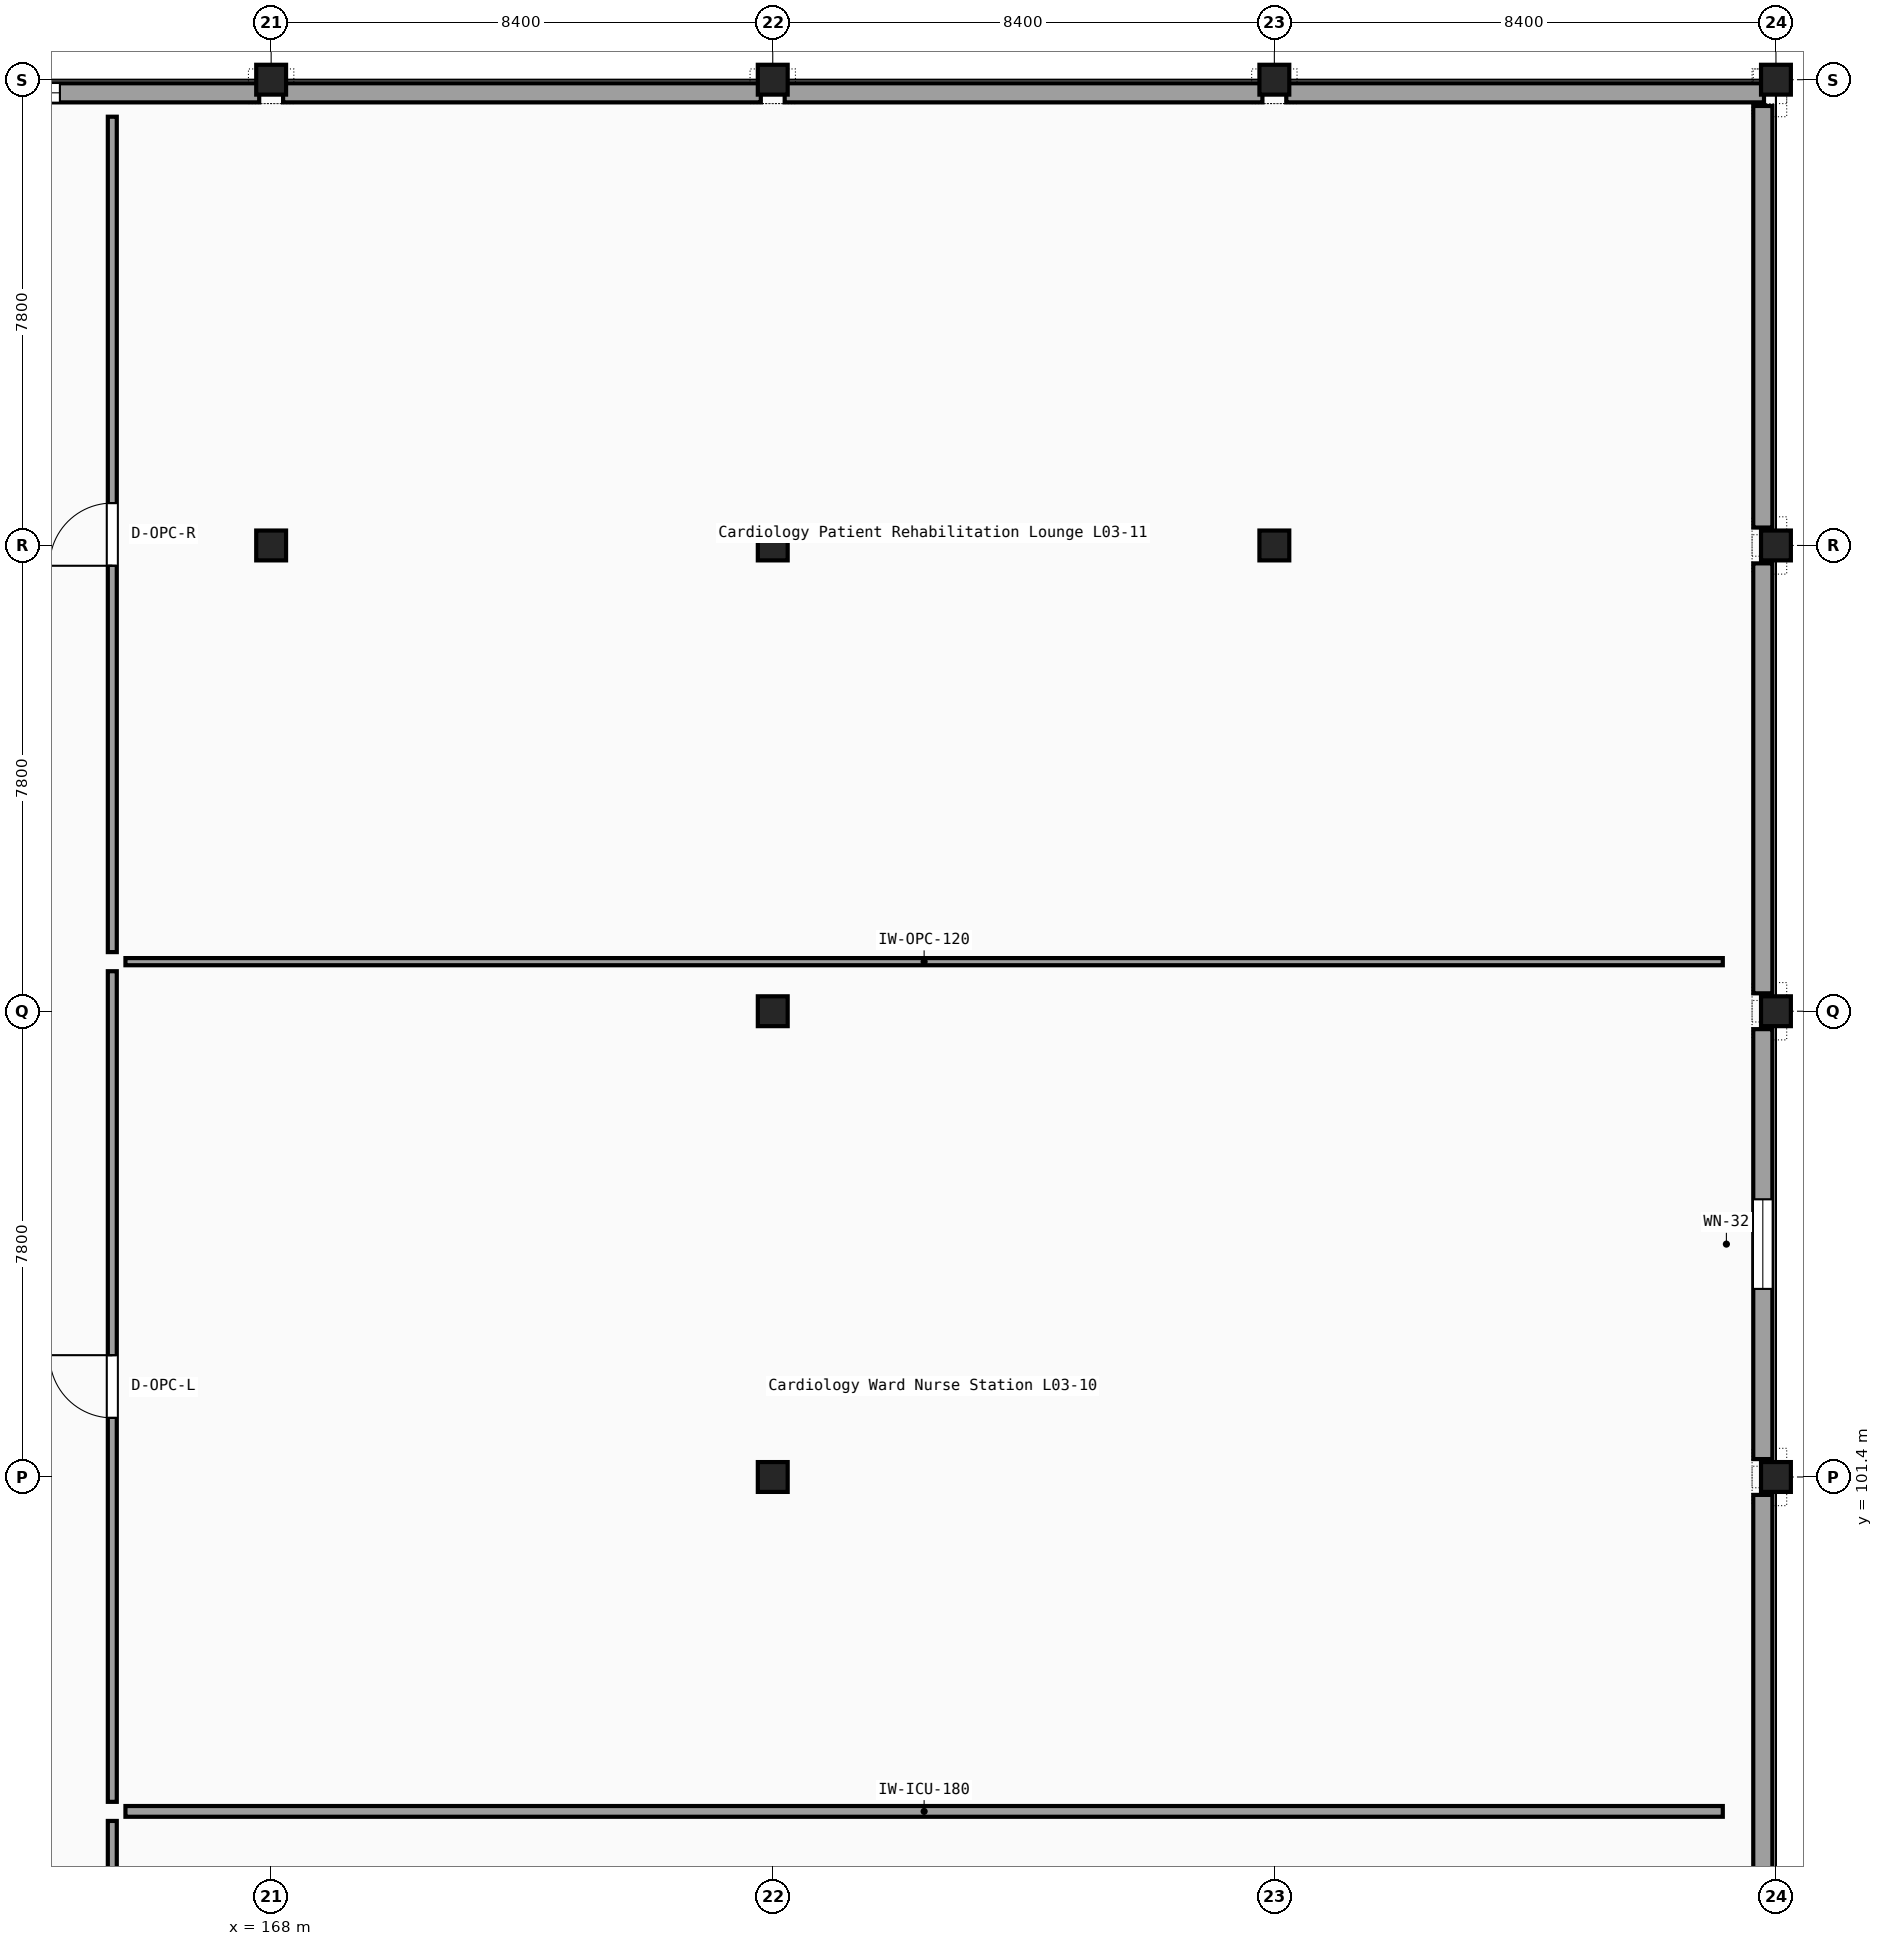
"""IFC4 building model, lengths in metres.
Left out: names, types, materials, properties, quantities, classifications, styles, units other than length and angle.
Written with IfcOpenShell. Run it as: python <this file> out.ifc"""

import sys

from ifc_helpers import new_model, si_unit, direction, frame, frame_2d, origin, origin_2d, place, context, subcontext, project, spatial, rectangle, i_section, extrude, element, fill, save


model = new_model("IFC4")
c1 = context("Model", 3, precision=1e-05, world=origin(), true_north=direction((0.0, 1.0)))
c2 = subcontext(c1, "Body", "Model", "MODEL_VIEW")
j1 = project(units=[si_unit("LENGTHUNIT", "METRE"), si_unit("PLANEANGLEUNIT", "RADIAN")], contexts=[c1])
p1 = place(None, origin())
s1 = spatial("IfcSite", under=j1, at=p1, CompositionType="ELEMENT")
p2 = place(p1, origin())
s2 = spatial("IfcBuilding", under=s1, at=p2, CompositionType="ELEMENT")
p3 = place(p2, frame((0.0, 0.0, 14.85)))
s3 = spatial("IfcBuildingStorey", under=s2, at=p3, CompositionType="ELEMENT", Elevation=14.85)
for number, where, z_axis, x_axis in (
    (1, (168.0, 117.0, 0.0), (0.0, 0.0, 1.0), (1.0, 0.0, 0.0)),
    (2, (168.0, 124.8, 0.0), (0.0, 0.0, 1.0), (1.0, 0.0, 0.0)),
    (3, (176.4, 101.4, 0.0), (0.0, 0.0, 1.0), (1.0, 0.0, 0.0)),
    (4, (176.4, 109.2, 0.0), (0.0, 0.0, 1.0), (1.0, 0.0, 0.0)),
    (5, (176.4, 117.0, 0.0), (0.0, 0.0, 1.0), (1.0, 0.0, 0.0)),
    (6, (176.4, 124.8, 0.0), (0.0, 0.0, 1.0), (1.0, 0.0, 0.0)),
    (7, (184.8, 117.0, 0.0), (0.0, 0.0, 1.0), (1.0, 0.0, 0.0)),
    (8, (184.8, 124.8, 0.0), (0.0, 0.0, 1.0), (1.0, 0.0, 0.0)),
    (9, (193.2, 101.4, 0.0), (0.0, 0.0, 1.0), (1.0, 0.0, 0.0)),
    (10, (193.2, 109.2, 0.0), (0.0, 0.0, 1.0), (1.0, 0.0, 0.0)),
    (11, (193.2, 117.0, 0.0), (0.0, 0.0, 1.0), (1.0, 0.0, 0.0)),
    (12, (193.2, 124.8, 0.0), (0.0, 0.0, 1.0), (1.0, 0.0, 0.0)),
):
    element("IfcColumn", number, at=place(p3, frame(where, z_axis=z_axis, x_axis=x_axis)), inside=s3, PredefinedType="COLUMN", context=c2, shape_type="SweptSolid", body=[
        extrude(i_section(OverallWidth=0.3, OverallDepth=0.5, WebThickness=0.014, FlangeThickness=0.028, FilletRadius=0.027, at=origin_2d()), origin(), (0.0, 0.0, 1.0), 4.05),
    ])
p4 = place(p3, frame((159.975, 124.58, 0.0), z_axis=(0.0, 0.0, 1.0), x_axis=(1.0, 0.0, 0.0)))
e13 = element("IfcWall", 13, at=p4, inside=s3, PredefinedType="SOLIDWALL", context=c2, shape_type="SweptSolid", body=[
    extrude(rectangle(XDim=7.825, YDim=0.32, at=frame_2d((3.913, 0.0))), origin(), (0.0, 0.0, 1.0), 3.45),
])
p5 = place(p4, frame((3.337, 0.0, 0.7)))
e14 = element("IfcOpeningElement", 14, at=p5, cuts=e13, PredefinedType="OPENING", context=c2, shape_type="SweptSolid", body=[
    extrude(rectangle(XDim=1.15, YDim=1.95, at=frame_2d((0.575, 0.975))), frame((0.0, 0.17, 0.0), z_axis=(0.0, -1.0, 0.0), x_axis=(1.0, 0.0, 0.0)), (0.0, 0.0, 1.0), 0.34),
])
for number, where, z_axis, x_axis in (
    (15, (168.2, 124.58, 0.0), (0.0, 0.0, 1.0), (1.0, 0.0, 0.0)),
    (16, (176.6, 124.58, 0.0), (0.0, 0.0, 1.0), (1.0, 0.0, 0.0)),
    (17, (185.0, 124.58, 0.0), (0.0, 0.0, 1.0), (1.0, 0.0, 0.0)),
):
    element("IfcWall", number, at=place(p3, frame(where, z_axis=z_axis, x_axis=x_axis)), inside=s3, PredefinedType="SOLIDWALL", context=c2, shape_type="SweptSolid", body=[
        extrude(rectangle(XDim=8.0, YDim=0.32, at=frame_2d((4.0, 0.0))), origin(), (0.0, 0.0, 1.0), 3.45),
    ])
p6 = place(p3, frame((192.98, 93.9, 0.0), z_axis=(0.0, 0.0, 1.0), x_axis=(0.0, 1.0, 0.0)))
e18 = element("IfcWall", 18, at=p6, inside=s3, PredefinedType="SOLIDWALL", context=c2, shape_type="SweptSolid", body=[
    extrude(rectangle(XDim=7.2, YDim=0.32, at=frame_2d((3.6, 0.0))), origin(), (0.0, 0.0, 1.0), 3.35),
])
p7 = place(p3, frame((192.98, 101.7, 0.0), z_axis=(0.0, 0.0, 1.0), x_axis=(0.0, 1.0, 0.0)))
e19 = element("IfcWall", 19, at=p7, inside=s3, PredefinedType="SOLIDWALL", context=c2, shape_type="SweptSolid", body=[
    extrude(rectangle(XDim=7.2, YDim=0.32, at=frame_2d((3.6, 0.0))), origin(), (0.0, 0.0, 1.0), 3.35),
])
p8 = place(p7, frame((2.85, 0.0, 0.8)))
e20 = element("IfcOpeningElement", 20, at=p8, cuts=e19, PredefinedType="OPENING", context=c2, shape_type="SweptSolid", body=[
    extrude(rectangle(XDim=1.5, YDim=1.75, at=frame_2d((0.75, 0.875))), frame((0.0, 0.17, 0.0), z_axis=(0.0, -1.0, 0.0), x_axis=(1.0, 0.0, 0.0)), (0.0, 0.0, 1.0), 0.34),
])
p9 = place(p3, frame((192.98, 109.5, 0.0), z_axis=(0.0, 0.0, 1.0), x_axis=(0.0, 1.0, 0.0)))
e21 = element("IfcWall", 21, at=p9, inside=s3, PredefinedType="SOLIDWALL", context=c2, shape_type="SweptSolid", body=[
    extrude(rectangle(XDim=7.2, YDim=0.32, at=frame_2d((3.6, 0.0))), origin(), (0.0, 0.0, 1.0), 3.35),
])
p10 = place(p3, frame((192.98, 117.3, 0.0), z_axis=(0.0, 0.0, 1.0), x_axis=(0.0, 1.0, 0.0)))
e22 = element("IfcWall", 22, at=p10, inside=s3, PredefinedType="SOLIDWALL", context=c2, shape_type="SweptSolid", body=[
    extrude(rectangle(XDim=7.06, YDim=0.32, at=frame_2d((3.53, 0.0))), origin(), (0.0, 0.0, 1.0), 3.35),
])
p11 = place(p3, frame((165.34, 81.65, 0.0), z_axis=(0.0, 0.0, 1.0), x_axis=(0.0, 1.0, 0.0)))
e23 = element("IfcWall", 23, at=p11, inside=s3, PredefinedType="PARTITIONING", context=c2, shape_type="SweptSolid", body=[
    extrude(rectangle(XDim=13.99, YDim=0.15, at=frame_2d((6.995, 0.0))), origin(), (0.0, 0.0, 1.0), 3.35),
])
p12 = place(p11, frame((6.145, 0.0, 0.0)))
e24 = element("IfcOpeningElement", 24, at=p12, cuts=e23, PredefinedType="OPENING", context=c2, shape_type="SweptSolid", body=[
    extrude(rectangle(XDim=1.7, YDim=2.3, at=frame_2d((0.85, 1.15))), frame((0.0, 0.085, 0.0), z_axis=(0.0, -1.0, 0.0), x_axis=(1.0, 0.0, 0.0)), (0.0, 0.0, 1.0), 0.17),
])
p13 = place(p3, frame((165.56, 95.8, 0.0), z_axis=(0.0, 0.0, 1.0), x_axis=(1.0, 0.0, 0.0)))
e25 = element("IfcWall", 25, at=p13, inside=s3, PredefinedType="PARTITIONING", context=c2, shape_type="SweptSolid", body=[
    extrude(rectangle(XDim=26.75, YDim=0.18, at=frame_2d((13.375, 0.0))), origin(), (0.0, 0.0, 1.0), 3.48),
])
p14 = place(p3, frame((165.34, 95.96, 0.0), z_axis=(0.0, 0.0, 1.0), x_axis=(0.0, 1.0, 0.0)))
e26 = element("IfcWall", 26, at=p14, inside=s3, PredefinedType="PARTITIONING", context=c2, shape_type="SweptSolid", body=[
    extrude(rectangle(XDim=13.91, YDim=0.15, at=frame_2d((6.955, 0.0))), origin(), (0.0, 0.0, 1.0), 3.35),
])
p15 = place(p14, frame((6.43, 0.0, 0.0)))
e27 = element("IfcOpeningElement", 27, at=p15, cuts=e26, PredefinedType="OPENING", context=c2, shape_type="SweptSolid", body=[
    extrude(rectangle(XDim=1.05, YDim=2.15, at=frame_2d((0.525, 1.075))), frame((0.0, 0.085, 0.0), z_axis=(0.0, -1.0, 0.0), x_axis=(1.0, 0.0, 0.0)), (0.0, 0.0, 1.0), 0.17),
])
p16 = place(p3, frame((165.56, 110.03, 0.0), z_axis=(0.0, 0.0, 1.0), x_axis=(1.0, 0.0, 0.0)))
e28 = element("IfcWall", 28, at=p16, inside=s3, PredefinedType="PARTITIONING", context=c2, shape_type="SweptSolid", body=[
    extrude(rectangle(XDim=26.75, YDim=0.12, at=frame_2d((13.375, 0.0))), origin(), (0.0, 0.0, 1.0), 3.48),
])
p17 = place(p3, frame((165.34, 110.19, 0.0), z_axis=(0.0, 0.0, 1.0), x_axis=(0.0, 1.0, 0.0)))
e29 = element("IfcWall", 29, at=p17, inside=s3, PredefinedType="PARTITIONING", context=c2, shape_type="SweptSolid", body=[
    extrude(rectangle(XDim=13.99, YDim=0.15, at=frame_2d((6.995, 0.0))), origin(), (0.0, 0.0, 1.0), 3.35),
])
p18 = place(p17, frame((6.47, 0.0, 0.0)))
e30 = element("IfcOpeningElement", 30, at=p18, cuts=e29, PredefinedType="OPENING", context=c2, shape_type="SweptSolid", body=[
    extrude(rectangle(XDim=1.05, YDim=2.15, at=frame_2d((0.525, 1.075))), frame((0.0, 0.085, 0.0), z_axis=(0.0, -1.0, 0.0), x_axis=(1.0, 0.0, 0.0)), (0.0, 0.0, 1.0), 0.17),
])
p19 = place(p5, origin())
e31 = element("IfcWindow", 31, at=p19, inside=s3, PartitioningType="SINGLE_PANEL", PredefinedType="WINDOW", context=c2, shape_type="SweptSolid", body=[
    extrude(rectangle(XDim=1.15, YDim=1.95, at=frame_2d((0.575, 0.975))), frame((0.0, 0.03, 0.0), z_axis=(0.0, -1.0, 0.0), x_axis=(1.0, 0.0, 0.0)), (0.0, 0.0, 1.0), 0.06),
])
fill(e14, e31)
p20 = place(p8, origin())
e32 = element("IfcWindow", 32, at=p20, inside=s3, PartitioningType="SINGLE_PANEL", PredefinedType="WINDOW", context=c2, shape_type="SweptSolid", body=[
    extrude(rectangle(XDim=1.5, YDim=1.75, at=frame_2d((0.75, 0.875))), frame((0.0, 0.03, 0.0), z_axis=(0.0, -1.0, 0.0), x_axis=(1.0, 0.0, 0.0)), (0.0, 0.0, 1.0), 0.06),
])
fill(e20, e32)
p21 = place(p15, origin())
e33 = element("IfcDoor", 33, at=p21, inside=s3, OperationType="SINGLE_SWING_RIGHT", PredefinedType="DOOR", context=c2, shape_type="SweptSolid", body=[
    extrude(rectangle(XDim=1.05, YDim=2.15, at=frame_2d((0.525, 1.075))), frame((0.0, 0.025, 0.0), z_axis=(0.0, -1.0, 0.0), x_axis=(1.0, 0.0, 0.0)), (0.0, 0.0, 1.0), 0.05),
])
fill(e27, e33)
p22 = place(p18, origin())
e34 = element("IfcDoor", 34, at=p22, inside=s3, OperationType="SINGLE_SWING_LEFT", PredefinedType="DOOR", context=c2, shape_type="SweptSolid", body=[
    extrude(rectangle(XDim=1.05, YDim=2.15, at=frame_2d((0.525, 1.075))), frame((0.0, 0.025, 0.0), z_axis=(0.0, -1.0, 0.0), x_axis=(1.0, 0.0, 0.0)), (0.0, 0.0, 1.0), 0.05),
])
fill(e30, e34)
save(model, sys.argv[1])
